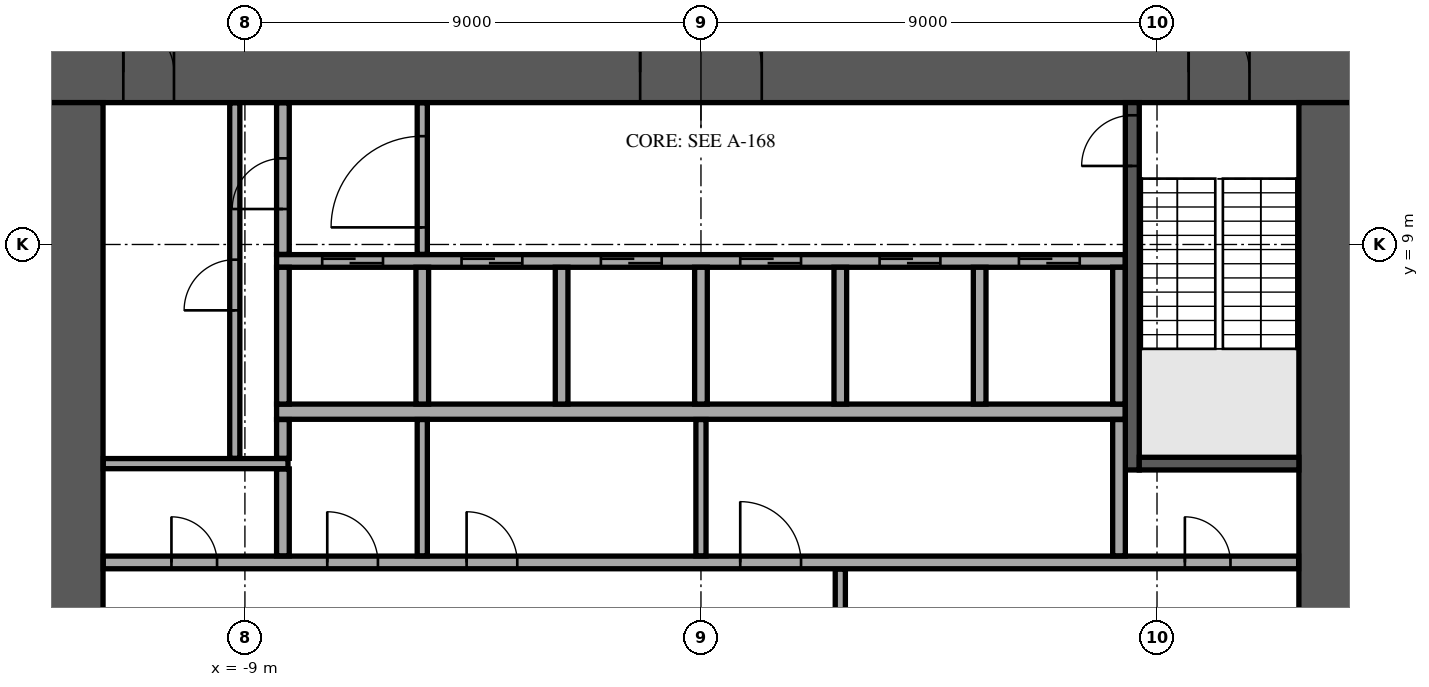
"""IFC4 building model, lengths in metres.
Left out: names, types, materials, properties, quantities, classifications, styles, units other than length and angle.
Written with IfcOpenShell. Run it as: python <this file> out.ifc"""

import sys

from ifc_helpers import new_model, si_unit, direction, frame, frame_2d, origin, place, context, subcontext, project, spatial, rectangle, extrude, element, fill, save


model = new_model("IFC4")
c1 = context("Model", 3, precision=1e-05, world=origin(), true_north=direction((0.0, 1.0)))
c2 = subcontext(c1, "Body", "Model", "MODEL_VIEW")
j1 = project(units=[si_unit("LENGTHUNIT", "METRE"), si_unit("PLANEANGLEUNIT", "RADIAN")], contexts=[c1])
p1 = place(None, origin())
s1 = spatial("IfcSite", under=j1, at=p1, CompositionType="ELEMENT")
p2 = place(p1, origin())
s2 = spatial("IfcBuilding", under=s1, at=p2, CompositionType="ELEMENT")
p3 = place(p2, frame((0.0, 0.0, 22.5)))
s3 = spatial("IfcBuildingStorey", under=s2, at=p3, CompositionType="ELEMENT", Elevation=22.5)
p4 = place(p3, frame((-13.0, 12.4, 0.0), z_axis=(0.0, 0.0, 1.0), x_axis=(1.0, 0.0, 0.0)))
e1 = element("IfcWall", 1, at=p4, inside=s3, PredefinedType="SHEAR", context=c2, shape_type="SweptSolid", body=[
    extrude(rectangle(XDim=26.0, YDim=1.2, at=frame_2d((13.0, 0.0))), origin(), (0.0, 0.0, 1.0), 4.35),
])
p5 = place(p4, frame((11.8, 0.0, 0.0)))
e2 = element("IfcOpeningElement", 2, at=p5, cuts=e1, PredefinedType="OPENING", context=c2, shape_type="SweptSolid", body=[
    extrude(rectangle(XDim=2.4, YDim=2.4, at=frame_2d((1.2, 1.2))), frame((0.0, 0.61, 0.0), z_axis=(0.0, -1.0, 0.0), x_axis=(1.0, 0.0, 0.0)), (0.0, 0.0, 1.0), 1.22),
])
p6 = place(p4, frame((22.625, 0.0, 0.0)))
e3 = element("IfcOpeningElement", 3, at=p6, cuts=e1, PredefinedType="OPENING", context=c2, shape_type="SweptSolid", body=[
    extrude(rectangle(XDim=1.2, YDim=2.1, at=frame_2d((0.6, 1.05))), frame((0.0, 0.61, 0.0), z_axis=(0.0, -1.0, 0.0), x_axis=(1.0, 0.0, 0.0)), (0.0, 0.0, 1.0), 1.22),
])
p7 = place(p4, frame((1.6, 0.0, 0.0)))
e4 = element("IfcOpeningElement", 4, at=p7, cuts=e1, PredefinedType="OPENING", context=c2, shape_type="SweptSolid", body=[
    extrude(rectangle(XDim=1.0, YDim=2.1, at=frame_2d((0.5, 1.05))), frame((0.0, 0.61, 0.0), z_axis=(0.0, -1.0, 0.0), x_axis=(1.0, 0.0, 0.0)), (0.0, 0.0, 1.0), 1.22),
])
p8 = place(p3, frame((12.4, -11.8, 0.0), z_axis=(0.0, 0.0, 1.0), x_axis=(0.0, 1.0, 0.0)))
e5 = element("IfcWall", 5, at=p8, inside=s3, PredefinedType="SHEAR", context=c2, shape_type="SweptSolid", body=[
    extrude(rectangle(XDim=23.6, YDim=1.2, at=frame_2d((11.8, 0.0))), origin(), (0.0, 0.0, 1.0), 4.35),
])
p9 = place(p8, frame((10.6, 0.0, 0.0)))
e6 = element("IfcOpeningElement", 6, at=p9, cuts=e5, PredefinedType="OPENING", context=c2, shape_type="SweptSolid", body=[
    extrude(rectangle(XDim=2.4, YDim=2.4, at=frame_2d((1.2, 1.2))), frame((0.0, 0.61, 0.0), z_axis=(0.0, -1.0, 0.0), x_axis=(1.0, 0.0, 0.0)), (0.0, 0.0, 1.0), 1.22),
])
p10 = place(p3, frame((-12.4, -11.8, 0.0), z_axis=(0.0, 0.0, 1.0), x_axis=(0.0, 1.0, 0.0)))
e7 = element("IfcWall", 7, at=p10, inside=s3, PredefinedType="SHEAR", context=c2, shape_type="SweptSolid", body=[
    extrude(rectangle(XDim=23.6, YDim=1.2, at=frame_2d((11.8, 0.0))), origin(), (0.0, 0.0, 1.0), 4.35),
])
p11 = place(p10, frame((10.6, 0.0, 0.0)))
e8 = element("IfcOpeningElement", 8, at=p11, cuts=e7, PredefinedType="OPENING", context=c2, shape_type="SweptSolid", body=[
    extrude(rectangle(XDim=2.4, YDim=2.4, at=frame_2d((1.2, 1.2))), frame((0.0, 0.61, 0.0), z_axis=(0.0, -1.0, 0.0), x_axis=(1.0, 0.0, 0.0)), (0.0, 0.0, 1.0), 1.22),
])
p12 = place(p3, frame((-8.375, 5.7, 0.0), z_axis=(0.0, 0.0, 1.0), x_axis=(1.0, 0.0, 0.0)))
e9 = element("IfcWall", 9, at=p12, inside=s3, PredefinedType="SOLIDWALL", context=c2, shape_type="SweptSolid", body=[
    extrude(rectangle(XDim=16.75, YDim=0.3, at=frame_2d((8.375, 0.0))), origin(), (0.0, 0.0, 1.0), 4.35),
])
p13 = place(p3, frame((-8.375, 8.675, 0.0), z_axis=(0.0, 0.0, 1.0), x_axis=(1.0, 0.0, 0.0)))
e10 = element("IfcWall", 10, at=p13, inside=s3, PredefinedType="SOLIDWALL", context=c2, shape_type="SweptSolid", body=[
    extrude(rectangle(XDim=16.75, YDim=0.25, at=frame_2d((8.375, 0.0))), origin(), (0.0, 0.0, 1.0), 4.35),
])
p14 = place(p13, frame((0.9, 0.0, 0.0)))
e11 = element("IfcOpeningElement", 11, at=p14, cuts=e10, PredefinedType="OPENING", context=c2, shape_type="SweptSolid", body=[
    extrude(rectangle(XDim=1.2, YDim=2.1, at=frame_2d((0.6, 1.05))), frame((0.0, 0.135, 0.0), z_axis=(0.0, -1.0, 0.0), x_axis=(1.0, 0.0, 0.0)), (0.0, 0.0, 1.0), 0.27),
])
p15 = place(p13, frame((3.65, 0.0, 0.0)))
e12 = element("IfcOpeningElement", 12, at=p15, cuts=e10, PredefinedType="OPENING", context=c2, shape_type="SweptSolid", body=[
    extrude(rectangle(XDim=1.2, YDim=2.1, at=frame_2d((0.6, 1.05))), frame((0.0, 0.135, 0.0), z_axis=(0.0, -1.0, 0.0), x_axis=(1.0, 0.0, 0.0)), (0.0, 0.0, 1.0), 0.27),
])
p16 = place(p13, frame((6.4, 0.0, 0.0)))
e13 = element("IfcOpeningElement", 13, at=p16, cuts=e10, PredefinedType="OPENING", context=c2, shape_type="SweptSolid", body=[
    extrude(rectangle(XDim=1.2, YDim=2.1, at=frame_2d((0.6, 1.05))), frame((0.0, 0.135, 0.0), z_axis=(0.0, -1.0, 0.0), x_axis=(1.0, 0.0, 0.0)), (0.0, 0.0, 1.0), 0.27),
])
p17 = place(p13, frame((9.15, 0.0, 0.0)))
e14 = element("IfcOpeningElement", 14, at=p17, cuts=e10, PredefinedType="OPENING", context=c2, shape_type="SweptSolid", body=[
    extrude(rectangle(XDim=1.2, YDim=2.1, at=frame_2d((0.6, 1.05))), frame((0.0, 0.135, 0.0), z_axis=(0.0, -1.0, 0.0), x_axis=(1.0, 0.0, 0.0)), (0.0, 0.0, 1.0), 0.27),
])
p18 = place(p13, frame((11.9, 0.0, 0.0)))
e15 = element("IfcOpeningElement", 15, at=p18, cuts=e10, PredefinedType="OPENING", context=c2, shape_type="SweptSolid", body=[
    extrude(rectangle(XDim=1.2, YDim=2.1, at=frame_2d((0.6, 1.05))), frame((0.0, 0.135, 0.0), z_axis=(0.0, -1.0, 0.0), x_axis=(1.0, 0.0, 0.0)), (0.0, 0.0, 1.0), 0.27),
])
p19 = place(p13, frame((14.65, 0.0, 0.0)))
e16 = element("IfcOpeningElement", 16, at=p19, cuts=e10, PredefinedType="OPENING", context=c2, shape_type="SweptSolid", body=[
    extrude(rectangle(XDim=1.2, YDim=2.1, at=frame_2d((0.6, 1.05))), frame((0.0, 0.135, 0.0), z_axis=(0.0, -1.0, 0.0), x_axis=(1.0, 0.0, 0.0)), (0.0, 0.0, 1.0), 0.27),
])
for number, where, z_axis, x_axis in (
    (17, (-8.25, 5.85, 0.0), (0.0, 0.0, 1.0), (0.0, 1.0, 0.0)),
    (18, (-5.5, 5.85, 0.0), (0.0, 0.0, 1.0), (0.0, 1.0, 0.0)),
    (19, (-2.75, 5.85, 0.0), (0.0, 0.0, 1.0), (0.0, 1.0, 0.0)),
    (20, (0.0, 5.85, 0.0), (0.0, 0.0, 1.0), (0.0, 1.0, 0.0)),
    (21, (2.75, 5.85, 0.0), (0.0, 0.0, 1.0), (0.0, 1.0, 0.0)),
    (22, (5.5, 5.85, 0.0), (0.0, 0.0, 1.0), (0.0, 1.0, 0.0)),
    (23, (8.25, 5.85, 0.0), (0.0, 0.0, 1.0), (0.0, 1.0, 0.0)),
):
    element("IfcWall", number, at=place(p3, frame(where, z_axis=z_axis, x_axis=x_axis)), inside=s3, PredefinedType="SOLIDWALL", context=c2, shape_type="SweptSolid", body=[
        extrude(rectangle(XDim=2.7, YDim=0.25, at=frame_2d((1.35, 0.0))), origin(), (0.0, 0.0, 1.0), 4.35),
    ])
p20 = place(p3, frame((8.512, 4.55, 0.0), z_axis=(0.0, 0.0, 1.0), x_axis=(0.0, 1.0, 0.0)))
e24 = element("IfcWall", 24, at=p20, inside=s3, PredefinedType="SOLIDWALL", context=c2, shape_type="SweptSolid", body=[
    extrude(rectangle(XDim=7.25, YDim=0.275, at=frame_2d((3.625, 0.0))), origin(), (0.0, 0.0, 1.0), 4.35),
])
p21 = place(p20, frame((6.0, 0.0, 0.0)))
e25 = element("IfcOpeningElement", 25, at=p21, cuts=e24, PredefinedType="OPENING", context=c2, shape_type="SweptSolid", body=[
    extrude(rectangle(XDim=1.0, YDim=2.1, at=frame_2d((0.5, 1.05))), frame((0.0, 0.147, 0.0), z_axis=(0.0, -1.0, 0.0), x_axis=(1.0, 0.0, 0.0)), (0.0, 0.0, 1.0), 0.295),
])
p22 = place(p3, frame((8.65, 4.675, 0.0), z_axis=(0.0, 0.0, 1.0), x_axis=(1.0, 0.0, 0.0)))
e26 = element("IfcWall", 26, at=p22, inside=s3, PredefinedType="SOLIDWALL", context=c2, shape_type="SweptSolid", body=[
    extrude(rectangle(XDim=3.15, YDim=0.25, at=frame_2d((1.575, 0.0))), origin(), (0.0, 0.0, 1.0), 4.35),
])
p23 = place(p3, frame((2.75, -2.595, 0.0), z_axis=(0.0, 0.0, 1.0), x_axis=(0.0, 1.0, 0.0)))
e27 = element("IfcWall", 27, at=p23, inside=s3, PredefinedType="PARTITIONING", context=c2, shape_type="SweptSolid", body=[
    extrude(rectangle(XDim=5.19, YDim=0.2, at=frame_2d((2.595, 0.0))), origin(), (0.0, 0.0, 1.0), 4.35),
])
p24 = place(p23, frame((1.395, 0.0, 0.0)))
e28 = element("IfcOpeningElement", 28, at=p24, cuts=e27, PredefinedType="OPENING", context=c2, shape_type="SweptSolid", body=[
    extrude(rectangle(XDim=2.4, YDim=2.4, at=frame_2d((1.2, 1.2))), frame((0.0, 0.11, 0.0), z_axis=(0.0, -1.0, 0.0), x_axis=(1.0, 0.0, 0.0)), (0.0, 0.0, 1.0), 0.22),
])
p25 = place(p3, frame((-11.795, 2.725, 0.0), z_axis=(0.0, 0.0, 1.0), x_axis=(1.0, 0.0, 0.0)))
e29 = element("IfcWall", 29, at=p25, inside=s3, PredefinedType="PARTITIONING", context=c2, shape_type="SweptSolid", body=[
    extrude(rectangle(XDim=23.59, YDim=0.25, at=frame_2d((11.795, 0.0))), origin(), (0.0, 0.0, 1.0), 4.35),
])
p26 = place(p25, frame((21.345, 0.0, 0.0)))
e30 = element("IfcOpeningElement", 30, at=p26, cuts=e29, PredefinedType="OPENING", context=c2, shape_type="SweptSolid", body=[
    extrude(rectangle(XDim=0.9, YDim=2.1, at=frame_2d((0.45, 1.05))), frame((0.0, 0.135, 0.0), z_axis=(0.0, -1.0, 0.0), x_axis=(1.0, 0.0, 0.0)), (0.0, 0.0, 1.0), 0.27),
])
p27 = place(p25, frame((1.345, 0.0, 0.0)))
e31 = element("IfcOpeningElement", 31, at=p27, cuts=e29, PredefinedType="OPENING", context=c2, shape_type="SweptSolid", body=[
    extrude(rectangle(XDim=0.9, YDim=2.1, at=frame_2d((0.45, 1.05))), frame((0.0, 0.135, 0.0), z_axis=(0.0, -1.0, 0.0), x_axis=(1.0, 0.0, 0.0)), (0.0, 0.0, 1.0), 0.27),
])
p28 = place(p25, frame((4.42, 0.0, 0.0)))
e32 = element("IfcOpeningElement", 32, at=p28, cuts=e29, PredefinedType="OPENING", context=c2, shape_type="SweptSolid", body=[
    extrude(rectangle(XDim=1.0, YDim=2.1, at=frame_2d((0.5, 1.05))), frame((0.0, 0.135, 0.0), z_axis=(0.0, -1.0, 0.0), x_axis=(1.0, 0.0, 0.0)), (0.0, 0.0, 1.0), 0.27),
])
p29 = place(p25, frame((7.17, 0.0, 0.0)))
e33 = element("IfcOpeningElement", 33, at=p29, cuts=e29, PredefinedType="OPENING", context=c2, shape_type="SweptSolid", body=[
    extrude(rectangle(XDim=1.0, YDim=2.1, at=frame_2d((0.5, 1.05))), frame((0.0, 0.135, 0.0), z_axis=(0.0, -1.0, 0.0), x_axis=(1.0, 0.0, 0.0)), (0.0, 0.0, 1.0), 0.27),
])
p30 = place(p25, frame((12.57, 0.0, 0.0)))
e34 = element("IfcOpeningElement", 34, at=p30, cuts=e29, PredefinedType="OPENING", context=c2, shape_type="SweptSolid", body=[
    extrude(rectangle(XDim=1.2, YDim=2.1, at=frame_2d((0.6, 1.05))), frame((0.0, 0.135, 0.0), z_axis=(0.0, -1.0, 0.0), x_axis=(1.0, 0.0, 0.0)), (0.0, 0.0, 1.0), 0.27),
])
p31 = place(p3, frame((-8.25, 2.855, 0.0), z_axis=(0.0, 0.0, 1.0), x_axis=(0.0, 1.0, 0.0)))
e35 = element("IfcWall", 35, at=p31, inside=s3, PredefinedType="PARTITIONING", context=c2, shape_type="SweptSolid", body=[
    extrude(rectangle(XDim=1.715, YDim=0.25, at=frame_2d((0.857, 0.0))), origin(), (0.0, 0.0, 1.0), 4.35),
])
for number, where, z_axis, x_axis in (
    (36, (-5.5, 2.855, 0.0), (0.0, 0.0, 1.0), (0.0, 1.0, 0.0)),
    (37, (0.0, 2.855, 0.0), (0.0, 0.0, 1.0), (0.0, 1.0, 0.0)),
):
    element("IfcWall", number, at=place(p3, frame(where, z_axis=z_axis, x_axis=x_axis)), inside=s3, PredefinedType="PARTITIONING", context=c2, shape_type="SweptSolid", body=[
        extrude(rectangle(XDim=2.69, YDim=0.2, at=frame_2d((1.345, 0.0))), origin(), (0.0, 0.0, 1.0), 4.35),
    ])
p32 = place(p3, frame((8.25, 2.855, 0.0), z_axis=(0.0, 0.0, 1.0), x_axis=(0.0, 1.0, 0.0)))
e38 = element("IfcWall", 38, at=p32, inside=s3, PredefinedType="PARTITIONING", context=c2, shape_type="SweptSolid", body=[
    extrude(rectangle(XDim=2.69, YDim=0.25, at=frame_2d((1.345, 0.0))), origin(), (0.0, 0.0, 1.0), 4.35),
])
p33 = place(p3, frame((-11.795, 4.675, 0.0), z_axis=(0.0, 0.0, 1.0), x_axis=(1.0, 0.0, 0.0)))
e39 = element("IfcWall", 39, at=p33, inside=s3, PredefinedType="PARTITIONING", context=c2, shape_type="SweptSolid", body=[
    extrude(rectangle(XDim=3.645, YDim=0.2, at=frame_2d((1.823, 0.0))), origin(), (0.0, 0.0, 1.0), 4.35),
])
p34 = place(p3, frame((-9.2, 4.78, 0.0), z_axis=(0.0, 0.0, 1.0), x_axis=(0.0, 1.0, 0.0)))
e40 = element("IfcWall", 40, at=p34, inside=s3, PredefinedType="PARTITIONING", context=c2, shape_type="SweptSolid", body=[
    extrude(rectangle(XDim=7.015, YDim=0.2, at=frame_2d((3.507, 0.0))), origin(), (0.0, 0.0, 1.0), 4.35),
])
p35 = place(p34, frame((2.92, 0.0, 0.0)))
e41 = element("IfcOpeningElement", 41, at=p35, cuts=e40, PredefinedType="OPENING", context=c2, shape_type="SweptSolid", body=[
    extrude(rectangle(XDim=1.0, YDim=2.1, at=frame_2d((0.5, 1.05))), frame((0.0, 0.11, 0.0), z_axis=(0.0, -1.0, 0.0), x_axis=(1.0, 0.0, 0.0)), (0.0, 0.0, 1.0), 0.22),
])
p36 = place(p3, frame((-8.25, 4.78, 0.0), z_axis=(0.0, 0.0, 1.0), x_axis=(0.0, 1.0, 0.0)))
e42 = element("IfcWall", 42, at=p36, inside=s3, PredefinedType="PARTITIONING", context=c2, shape_type="SweptSolid", body=[
    extrude(rectangle(XDim=0.765, YDim=0.25, at=frame_2d((0.382, 0.0))), origin(), (0.0, 0.0, 1.0), 4.35),
])
p37 = place(p3, frame((-8.25, 8.805, 0.0), z_axis=(0.0, 0.0, 1.0), x_axis=(0.0, 1.0, 0.0)))
e43 = element("IfcWall", 43, at=p37, inside=s3, PredefinedType="PARTITIONING", context=c2, shape_type="SweptSolid", body=[
    extrude(rectangle(XDim=2.99, YDim=0.25, at=frame_2d((1.495, 0.0))), origin(), (0.0, 0.0, 1.0), 4.35),
])
p38 = place(p37, frame((0.895, 0.0, 0.0)))
e44 = element("IfcOpeningElement", 44, at=p38, cuts=e43, PredefinedType="OPENING", context=c2, shape_type="SweptSolid", body=[
    extrude(rectangle(XDim=1.0, YDim=2.1, at=frame_2d((0.5, 1.05))), frame((0.0, 0.135, 0.0), z_axis=(0.0, -1.0, 0.0), x_axis=(1.0, 0.0, 0.0)), (0.0, 0.0, 1.0), 0.27),
])
p39 = place(p3, frame((-5.5, 8.805, 0.0), z_axis=(0.0, 0.0, 1.0), x_axis=(0.0, 1.0, 0.0)))
e45 = element("IfcWall", 45, at=p39, inside=s3, PredefinedType="PARTITIONING", context=c2, shape_type="SweptSolid", body=[
    extrude(rectangle(XDim=2.99, YDim=0.2, at=frame_2d((1.495, 0.0))), origin(), (0.0, 0.0, 1.0), 4.35),
])
p40 = place(p39, frame((0.532, 0.0, 0.0)))
e46 = element("IfcOpeningElement", 46, at=p40, cuts=e45, PredefinedType="OPENING", context=c2, shape_type="SweptSolid", body=[
    extrude(rectangle(XDim=1.8, YDim=2.1, at=frame_2d((0.9, 1.05))), frame((0.0, 0.11, 0.0), z_axis=(0.0, -1.0, 0.0), x_axis=(1.0, 0.0, 0.0)), (0.0, 0.0, 1.0), 0.22),
])
p41 = place(p5, origin())
e47 = element("IfcDoor", 47, at=p41, inside=s3, OperationType="SINGLE_SWING_LEFT", PredefinedType="DOOR", context=c2, shape_type="SweptSolid", body=[
    extrude(rectangle(XDim=2.4, YDim=2.4, at=frame_2d((1.2, 1.2))), frame((0.0, 0.025, 0.0), z_axis=(0.0, -1.0, 0.0), x_axis=(1.0, 0.0, 0.0)), (0.0, 0.0, 1.0), 0.05),
])
fill(e2, e47)
p42 = place(p6, origin())
e48 = element("IfcDoor", 48, at=p42, inside=s3, OperationType="SINGLE_SWING_LEFT", PredefinedType="DOOR", context=c2, shape_type="SweptSolid", body=[
    extrude(rectangle(XDim=1.2, YDim=2.1, at=frame_2d((0.6, 1.05))), frame((0.0, 0.025, 0.0), z_axis=(0.0, -1.0, 0.0), x_axis=(1.0, 0.0, 0.0)), (0.0, 0.0, 1.0), 0.05),
])
fill(e3, e48)
p43 = place(p7, origin())
e49 = element("IfcDoor", 49, at=p43, inside=s3, OperationType="SINGLE_SWING_LEFT", PredefinedType="DOOR", context=c2, shape_type="SweptSolid", body=[
    extrude(rectangle(XDim=1.0, YDim=2.1, at=frame_2d((0.5, 1.05))), frame((0.0, 0.025, 0.0), z_axis=(0.0, -1.0, 0.0), x_axis=(1.0, 0.0, 0.0)), (0.0, 0.0, 1.0), 0.05),
])
fill(e4, e49)
p44 = place(p14, origin())
e50 = element("IfcDoor", 50, at=p44, inside=s3, OperationType="DOUBLE_DOOR_SLIDING", PredefinedType="DOOR", context=c2, shape_type="SweptSolid", body=[
    extrude(rectangle(XDim=1.2, YDim=2.1, at=frame_2d((0.6, 1.05))), frame((0.0, 0.025, 0.0), z_axis=(0.0, -1.0, 0.0), x_axis=(1.0, 0.0, 0.0)), (0.0, 0.0, 1.0), 0.05),
])
fill(e11, e50)
p45 = place(p15, origin())
e51 = element("IfcDoor", 51, at=p45, inside=s3, OperationType="DOUBLE_DOOR_SLIDING", PredefinedType="DOOR", context=c2, shape_type="SweptSolid", body=[
    extrude(rectangle(XDim=1.2, YDim=2.1, at=frame_2d((0.6, 1.05))), frame((0.0, 0.025, 0.0), z_axis=(0.0, -1.0, 0.0), x_axis=(1.0, 0.0, 0.0)), (0.0, 0.0, 1.0), 0.05),
])
fill(e12, e51)
p46 = place(p16, origin())
e52 = element("IfcDoor", 52, at=p46, inside=s3, OperationType="DOUBLE_DOOR_SLIDING", PredefinedType="DOOR", context=c2, shape_type="SweptSolid", body=[
    extrude(rectangle(XDim=1.2, YDim=2.1, at=frame_2d((0.6, 1.05))), frame((0.0, 0.025, 0.0), z_axis=(0.0, -1.0, 0.0), x_axis=(1.0, 0.0, 0.0)), (0.0, 0.0, 1.0), 0.05),
])
fill(e13, e52)
p47 = place(p17, origin())
e53 = element("IfcDoor", 53, at=p47, inside=s3, OperationType="DOUBLE_DOOR_SLIDING", PredefinedType="DOOR", context=c2, shape_type="SweptSolid", body=[
    extrude(rectangle(XDim=1.2, YDim=2.1, at=frame_2d((0.6, 1.05))), frame((0.0, 0.025, 0.0), z_axis=(0.0, -1.0, 0.0), x_axis=(1.0, 0.0, 0.0)), (0.0, 0.0, 1.0), 0.05),
])
fill(e14, e53)
p48 = place(p18, origin())
e54 = element("IfcDoor", 54, at=p48, inside=s3, OperationType="DOUBLE_DOOR_SLIDING", PredefinedType="DOOR", context=c2, shape_type="SweptSolid", body=[
    extrude(rectangle(XDim=1.2, YDim=2.1, at=frame_2d((0.6, 1.05))), frame((0.0, 0.025, 0.0), z_axis=(0.0, -1.0, 0.0), x_axis=(1.0, 0.0, 0.0)), (0.0, 0.0, 1.0), 0.05),
])
fill(e15, e54)
p49 = place(p19, origin())
e55 = element("IfcDoor", 55, at=p49, inside=s3, OperationType="DOUBLE_DOOR_SLIDING", PredefinedType="DOOR", context=c2, shape_type="SweptSolid", body=[
    extrude(rectangle(XDim=1.2, YDim=2.1, at=frame_2d((0.6, 1.05))), frame((0.0, 0.025, 0.0), z_axis=(0.0, -1.0, 0.0), x_axis=(1.0, 0.0, 0.0)), (0.0, 0.0, 1.0), 0.05),
])
fill(e16, e55)
p50 = place(p21, origin())
e56 = element("IfcDoor", 56, at=p50, inside=s3, OperationType="SINGLE_SWING_LEFT", PredefinedType="DOOR", context=c2, shape_type="SweptSolid", body=[
    extrude(rectangle(XDim=1.0, YDim=2.1, at=frame_2d((0.5, 1.05))), frame((0.0, 0.025, 0.0), z_axis=(0.0, -1.0, 0.0), x_axis=(1.0, 0.0, 0.0)), (0.0, 0.0, 1.0), 0.05),
])
fill(e25, e56)
p51 = place(p26, origin())
e57 = element("IfcDoor", 57, at=p51, inside=s3, OperationType="SINGLE_SWING_RIGHT", PredefinedType="DOOR", context=c2, shape_type="SweptSolid", body=[
    extrude(rectangle(XDim=0.9, YDim=2.1, at=frame_2d((0.45, 1.05))), frame((0.0, 0.025, 0.0), z_axis=(0.0, -1.0, 0.0), x_axis=(1.0, 0.0, 0.0)), (0.0, 0.0, 1.0), 0.05),
])
fill(e30, e57)
p52 = place(p27, origin())
e58 = element("IfcDoor", 58, at=p52, inside=s3, OperationType="SINGLE_SWING_RIGHT", PredefinedType="DOOR", context=c2, shape_type="SweptSolid", body=[
    extrude(rectangle(XDim=0.9, YDim=2.1, at=frame_2d((0.45, 1.05))), frame((0.0, 0.025, 0.0), z_axis=(0.0, -1.0, 0.0), x_axis=(1.0, 0.0, 0.0)), (0.0, 0.0, 1.0), 0.05),
])
fill(e31, e58)
p53 = place(p35, origin())
e59 = element("IfcDoor", 59, at=p53, inside=s3, OperationType="SINGLE_SWING_RIGHT", PredefinedType="DOOR", context=c2, shape_type="SweptSolid", body=[
    extrude(rectangle(XDim=1.0, YDim=2.1, at=frame_2d((0.5, 1.05))), frame((0.0, 0.025, 0.0), z_axis=(0.0, -1.0, 0.0), x_axis=(1.0, 0.0, 0.0)), (0.0, 0.0, 1.0), 0.05),
])
fill(e41, e59)
p54 = place(p38, origin())
e60 = element("IfcDoor", 60, at=p54, inside=s3, OperationType="SINGLE_SWING_RIGHT", PredefinedType="DOOR", context=c2, shape_type="SweptSolid", body=[
    extrude(rectangle(XDim=1.0, YDim=2.1, at=frame_2d((0.5, 1.05))), frame((0.0, 0.025, 0.0), z_axis=(0.0, -1.0, 0.0), x_axis=(1.0, 0.0, 0.0)), (0.0, 0.0, 1.0), 0.05),
])
fill(e44, e60)
p55 = place(p28, origin())
e61 = element("IfcDoor", 61, at=p55, inside=s3, OperationType="SINGLE_SWING_RIGHT", PredefinedType="DOOR", context=c2, shape_type="SweptSolid", body=[
    extrude(rectangle(XDim=1.0, YDim=2.1, at=frame_2d((0.5, 1.05))), frame((0.0, 0.025, 0.0), z_axis=(0.0, -1.0, 0.0), x_axis=(1.0, 0.0, 0.0)), (0.0, 0.0, 1.0), 0.05),
])
fill(e32, e61)
p56 = place(p29, origin())
e62 = element("IfcDoor", 62, at=p56, inside=s3, OperationType="SINGLE_SWING_RIGHT", PredefinedType="DOOR", context=c2, shape_type="SweptSolid", body=[
    extrude(rectangle(XDim=1.0, YDim=2.1, at=frame_2d((0.5, 1.05))), frame((0.0, 0.025, 0.0), z_axis=(0.0, -1.0, 0.0), x_axis=(1.0, 0.0, 0.0)), (0.0, 0.0, 1.0), 0.05),
])
fill(e33, e62)
p57 = place(p30, origin())
e63 = element("IfcDoor", 63, at=p57, inside=s3, OperationType="SINGLE_SWING_LEFT", PredefinedType="DOOR", context=c2, shape_type="SweptSolid", body=[
    extrude(rectangle(XDim=1.2, YDim=2.1, at=frame_2d((0.6, 1.05))), frame((0.0, 0.025, 0.0), z_axis=(0.0, -1.0, 0.0), x_axis=(1.0, 0.0, 0.0)), (0.0, 0.0, 1.0), 0.05),
])
fill(e34, e63)
p58 = place(p40, origin())
e64 = element("IfcDoor", 64, at=p58, inside=s3, OperationType="SINGLE_SWING_LEFT", PredefinedType="DOOR", context=c2, shape_type="SweptSolid", body=[
    extrude(rectangle(XDim=1.8, YDim=2.1, at=frame_2d((0.9, 1.05))), frame((0.0, 0.025, 0.0), z_axis=(0.0, -1.0, 0.0), x_axis=(1.0, 0.0, 0.0)), (0.0, 0.0, 1.0), 0.05),
])
fill(e46, e64)
save(model, sys.argv[1])
